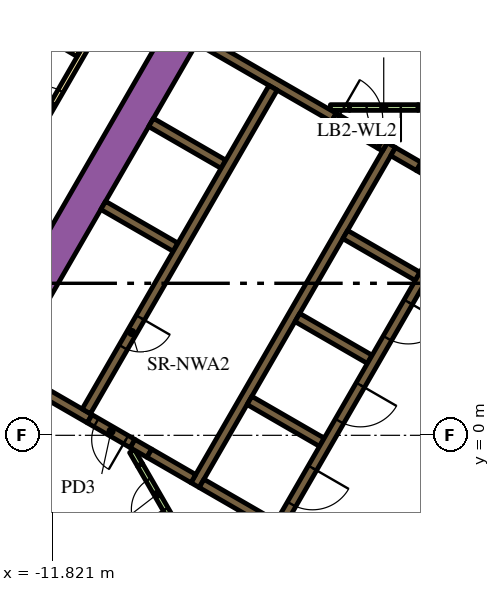
"""IFC4 building model, lengths in metres.
Left out: names, types, materials, properties, quantities, classifications, styles, units other than length and angle.
Written with IfcOpenShell. Run it as: python <this file> out.ifc"""

import sys

from ifc_helpers import new_model, si_unit, direction, frame, frame_2d, origin, place, context, subcontext, project, spatial, polyline, rectangle, outline, extrude, element, fill, save


model = new_model("IFC4")
c1 = context("Model", 3, precision=1e-05, world=origin(), true_north=direction((0.0, 1.0)))
c2 = subcontext(c1, "Body", "Model", "MODEL_VIEW")
j1 = project(units=[si_unit("LENGTHUNIT", "METRE"), si_unit("PLANEANGLEUNIT", "RADIAN")], contexts=[c1])
p1 = place(None, origin())
s1 = spatial("IfcSite", under=j1, at=p1, CompositionType="ELEMENT")
p2 = place(p1, origin())
s2 = spatial("IfcBuilding", under=s1, at=p2, CompositionType="ELEMENT")
p3 = place(p2, frame((0.0, 0.0, 58.8)))
s3 = spatial("IfcBuildingStorey", under=s2, at=p3, CompositionType="ELEMENT", Elevation=58.8)
p4 = place(p3, frame((-14.268, 0.387, 0.0), z_axis=(0.0, 0.0, 1.0), x_axis=(0.499994617707, 0.866028511231, 0.0)))
e1 = element("IfcWall", 1, at=p4, inside=s3, PredefinedType="SOLIDWALL", context=c2, shape_type="SweptSolid", body=[
    extrude(rectangle(XDim=18.817, YDim=0.9, at=frame_2d((9.409, 0.0))), origin(), (0.0, 0.0, 1.0), 3.9),
])
p5 = place(p3, frame((-8.06, -1.311, 0.0), z_axis=(0.0, 0.0, 1.0), x_axis=(0.50000273126, 0.866023826885, 0.0)))
e2 = element("IfcWall", 2, at=p5, inside=s3, PredefinedType="SOLIDWALL", context=c2, shape_type="SweptSolid", body=[
    extrude(rectangle(XDim=10.33, YDim=0.25, at=frame_2d((5.165, 0.0))), origin(), (0.0, 0.0, 1.0), 3.9),
])
p6 = place(p3, frame((-1.819, 6.87, 0.0), z_axis=(0.0, 0.0, 1.0), x_axis=(-0.866294599386, 0.499533449405, 0.0)))
e3 = element("IfcWall", 3, at=p6, inside=s3, PredefinedType="SOLIDWALL", context=c2, shape_type="SweptSolid", body=[
    extrude(rectangle(XDim=0.41, YDim=0.25, at=frame_2d((0.205, 0.0))), origin(), (0.0, 0.0, 1.0), 3.9),
])
p7 = place(p3, frame((-2.849, 7.465, 0.0), z_axis=(0.0, 0.0, 1.0), x_axis=(0.865955664968, -0.500120771724, 0.0)))
e4 = element("IfcWall", 4, at=p7, inside=s3, PredefinedType="SOLIDWALL", context=c2, shape_type="SweptSolid", body=[
    extrude(rectangle(XDim=0.778, YDim=0.25, at=frame_2d((0.389, 0.0))), origin(), (0.0, 0.0, 1.0), 3.9),
])
for number, where, z_axis, x_axis in (
    (5, (-2.204, 4.182, 0.0), (0.0, 0.0, 1.0), (-0.866, 0.5, 0.0)),
    (6, (-5.369, 3.1, 0.0), (0.0, 0.0, 1.0), (0.866, -0.5, 0.0)),
    (7, (-4.724, -0.182, 0.0), (0.0, 0.0, 1.0), (-0.866, 0.5, 0.0)),
):
    element("IfcWall", number, at=place(p3, frame(where, z_axis=z_axis, x_axis=x_axis)), inside=s3, PredefinedType="SOLIDWALL", context=c2, shape_type="SweptSolid", body=[
        extrude(rectangle(XDim=2.2, YDim=0.25, at=frame_2d((1.1, 0.0))), origin(), (0.0, 0.0, 1.0), 3.9),
    ])
p8 = place(p3, origin())
e8 = element("IfcWall", 8, at=p8, inside=s3, PredefinedType="SOLIDWALL", context=c2, shape_type="SweptSolid", body=[
    extrude(outline(polyline([(-5.922, -2.257), (-5.922, -2.257), (-5.705, -2.382), (-5.83, -2.598), (-6.418, -2.258), (-6.433, -2.153), (-6.433, -2.153), (-6.433, -2.153), (-6.508, -2.163), (-6.508, -2.163), (-6.508, -2.163), (-6.501, -2.21), (-7.952, -1.373), (-7.827, -1.156), (-5.922, -2.257)])), origin(), (0.0, 0.0, 1.0), 3.9),
])
p9 = place(p3, frame((-9.708, -0.215, 0.0), z_axis=(0.0, 0.0, 1.0), x_axis=(0.866113839764, -0.499846793097, 0.0)))
e9 = element("IfcWall", 9, at=p9, inside=s3, PredefinedType="SOLIDWALL", context=c2, shape_type="SweptSolid", body=[
    extrude(rectangle(XDim=0.51, YDim=0.25, at=frame_2d((0.255, 0.0))), origin(), (0.0, 0.0, 1.0), 3.9),
])
p10 = place(p3, frame((-12.999, 1.685, 0.0), z_axis=(0.0, 0.0, 1.0), x_axis=(0.865996765544, -0.500049599607, 0.0)))
e10 = element("IfcWall", 10, at=p10, inside=s3, PredefinedType="SOLIDWALL", context=c2, shape_type="SweptSolid", body=[
    extrude(rectangle(XDim=2.498, YDim=0.25, at=frame_2d((1.249, 0.0))), origin(), (0.0, 0.0, 1.0), 3.9),
])
p11 = place(p3, frame((-9.265, -0.471, 0.0), z_axis=(0.0, 0.0, 1.0), x_axis=(0.865954634268, -0.500122556369, 0.0)))
e11 = element("IfcWall", 11, at=p11, inside=s3, PredefinedType="SOLIDWALL", context=c2, shape_type="SweptSolid", body=[
    extrude(rectangle(XDim=1.338, YDim=0.25, at=frame_2d((0.669, 0.0))), origin(), (0.0, 0.0, 1.0), 3.9),
])
e12 = element("IfcWall", 12, at=p8, inside=s3, PredefinedType="SOLIDWALL", context=c2, shape_type="SweptSolid", body=[
    extrude(outline(polyline([(-3.128, 7.481), (-3.259, 7.557), (-3.134, 7.773), (-3.003, 7.698), (-3.128, 7.481)])), origin(), (0.0, 0.0, 1.0), 3.9),
])
for number, where, z_axis, x_axis in (
    (13, (-8.574, 4.95, 0.0), (0.0, 0.0, 1.0), (-0.866, 0.5, 0.0)),
    (14, (-7.314, 7.132, 0.0), (0.0, 0.0, 1.0), (-0.866, 0.5, 0.0)),
):
    element("IfcWall", number, at=place(p3, frame(where, z_axis=z_axis, x_axis=x_axis)), inside=s3, PredefinedType="SOLIDWALL", context=c2, shape_type="SweptSolid", body=[
        extrude(rectangle(XDim=2.2, YDim=0.25, at=frame_2d((1.1, 0.0))), origin(), (0.0, 0.0, 1.0), 3.9),
    ])
p12 = place(p3, frame((-7.959, 10.415, 0.0), z_axis=(0.0, 0.0, 1.0), x_axis=(0.866020958405, -0.500007699544, 0.0)))
e15 = element("IfcWall", 15, at=p12, inside=s3, PredefinedType="SOLIDWALL", context=c2, shape_type="SweptSolid", body=[
    extrude(rectangle(XDim=4.1, YDim=0.25, at=frame_2d((2.05, 0.0))), origin(), (0.0, 0.0, 1.0), 3.9),
])
p13 = place(p3, frame((-6.531, -2.689, 0.0), z_axis=(0.0, 0.0, 1.0), x_axis=(-0.499967446111, 0.866044197965, 0.0)))
e16 = element("IfcWall", 16, at=p13, inside=s3, PredefinedType="PARTITIONING", context=c2, shape_type="SweptSolid", body=[
    extrude(rectangle(XDim=0.748, YDim=0.15, at=frame_2d((0.374, 0.0))), origin(), (0.0, 0.0, 1.0), 2.75),
])
p14 = place(p3, frame((-9.512, -0.775, 0.0), z_axis=(0.0, 0.0, 1.0), x_axis=(-0.500080620599, 0.865978852456, 0.0)))
e17 = element("IfcWall", 17, at=p14, inside=s3, PredefinedType="PARTITIONING", context=c2, shape_type="SweptSolid", body=[
    extrude(rectangle(XDim=0.413, YDim=0.15, at=frame_2d((0.207, 0.0))), origin(), (0.0, 0.0, 1.0), 2.75),
])
p15 = place(p3, frame((-3.997, 8.625, 0.0), z_axis=(0.0, 0.0, 1.0), x_axis=(-1.0, 0.0, 0.0)))
e18 = element("IfcWall", 18, at=p15, inside=s3, PredefinedType="PARTITIONING", context=c2, shape_type="SweptSolid", body=[
    extrude(rectangle(XDim=0.502, YDim=0.15, at=frame_2d((0.251, 0.0))), origin(), (0.0, 0.0, 1.0), 2.75),
])
p16 = place(p3, frame((-2.196, 8.625, 0.0), z_axis=(0.0, 0.0, 1.0), x_axis=(1.0, 0.0, 0.0)))
e19 = element("IfcWall", 19, at=p16, inside=s3, PredefinedType="PARTITIONING", context=c2, shape_type="SweptSolid", body=[
    extrude(rectangle(XDim=1.146, YDim=0.15, at=frame_2d((0.573, 0.0))), origin(), (0.0, 0.0, 1.0), 2.75),
])
p17 = place(p3, frame((-6.008, 9.144, 0.0), z_axis=(0.0, 0.0, 1.0), x_axis=(-0.500006956611, -0.866021387346, 0.0)))
e20 = element("IfcWall", 20, at=p17, inside=s3, PredefinedType="SOLIDWALL", context=c2, shape_type="SweptSolid", body=[
    extrude(rectangle(XDim=9.83, YDim=0.25, at=frame_2d((4.915, 0.0))), origin(), (0.0, 0.0, 1.0), 3.9),
])
p18 = place(p17, frame((6.985, 0.0, 0.0)))
e21 = element("IfcOpeningElement", 21, at=p18, cuts=e20, PredefinedType="OPENING", context=c2, shape_type="SweptSolid", body=[
    extrude(rectangle(XDim=0.9, YDim=2.1, at=frame_2d((0.45, 1.05))), frame((0.0, 0.135, 0.0), z_axis=(0.0, -1.0, 0.0), x_axis=(1.0, 0.0, 0.0)), (0.0, 0.0, 1.0), 0.27),
])
p19 = place(p3, frame((-0.898, 6.194, 0.0), z_axis=(0.0, 0.0, 1.0), x_axis=(-0.499996202215, -0.866027596426, 0.0)))
e22 = element("IfcWall", 22, at=p19, inside=s3, PredefinedType="SOLIDWALL", context=c2, shape_type="SweptSolid", body=[
    extrude(rectangle(XDim=9.83, YDim=0.25, at=frame_2d((4.915, 0.0))), origin(), (0.0, 0.0, 1.0), 3.9),
])
p20 = place(p19, frame((0.585, 0.0, 0.0)))
e23 = element("IfcOpeningElement", 23, at=p20, cuts=e22, PredefinedType="OPENING", context=c2, shape_type="SweptSolid", body=[
    extrude(rectangle(XDim=1.1, YDim=2.1, at=frame_2d((0.55, 1.05))), frame((0.0, 0.135, 0.0), z_axis=(0.0, -1.0, 0.0), x_axis=(1.0, 0.0, 0.0)), (0.0, 0.0, 1.0), 0.27),
])
p21 = place(p19, frame((3.105, 0.0, 0.0)))
e24 = element("IfcOpeningElement", 24, at=p21, cuts=e22, PredefinedType="OPENING", context=c2, shape_type="SweptSolid", body=[
    extrude(rectangle(XDim=1.1, YDim=2.1, at=frame_2d((0.55, 1.05))), frame((0.0, 0.135, 0.0), z_axis=(0.0, -1.0, 0.0), x_axis=(1.0, 0.0, 0.0)), (0.0, 0.0, 1.0), 0.27),
])
p22 = place(p19, frame((5.625, 0.0, 0.0)))
e25 = element("IfcOpeningElement", 25, at=p22, cuts=e22, PredefinedType="OPENING", context=c2, shape_type="SweptSolid", body=[
    extrude(rectangle(XDim=1.1, YDim=2.1, at=frame_2d((0.55, 1.05))), frame((0.0, 0.135, 0.0), z_axis=(0.0, -1.0, 0.0), x_axis=(1.0, 0.0, 0.0)), (0.0, 0.0, 1.0), 0.27),
])
p23 = place(p19, frame((8.145, 0.0, 0.0)))
e26 = element("IfcOpeningElement", 26, at=p23, cuts=e22, PredefinedType="OPENING", context=c2, shape_type="SweptSolid", body=[
    extrude(rectangle(XDim=1.1, YDim=2.1, at=frame_2d((0.55, 1.05))), frame((0.0, 0.135, 0.0), z_axis=(0.0, -1.0, 0.0), x_axis=(1.0, 0.0, 0.0)), (0.0, 0.0, 1.0), 0.27),
])
p24 = place(p3, frame((-2.196, 8.625, 0.0), z_axis=(0.0, 0.0, 1.0), x_axis=(-1.0, 0.0, 0.0)))
e27 = element("IfcWall", 27, at=p24, inside=s3, PredefinedType="PARTITIONING", context=c2, shape_type="SweptSolid", body=[
    extrude(rectangle(XDim=1.8, YDim=0.15, at=frame_2d((0.9, 0.0))), origin(), (0.0, 0.0, 1.0), 2.75),
])
p25 = place(p24, frame((0.45, 0.0, 0.0)))
e28 = element("IfcOpeningElement", 28, at=p25, cuts=e27, PredefinedType="OPENING", context=c2, shape_type="SweptSolid", body=[
    extrude(rectangle(XDim=0.9, YDim=2.1, at=frame_2d((0.45, 1.05))), frame((0.0, 0.085, 0.0), z_axis=(0.0, -1.0, 0.0), x_axis=(1.0, 0.0, 0.0)), (0.0, 0.0, 1.0), 0.17),
])
p26 = place(p3, frame((-9.708, -0.215, 0.0), z_axis=(0.0, 0.0, 1.0), x_axis=(-0.866004217611, 0.500036693733, 0.0)))
e29 = element("IfcWall", 29, at=p26, inside=s3, PredefinedType="SOLIDWALL", context=c2, shape_type="SweptSolid", body=[
    extrude(rectangle(XDim=1.3, YDim=0.25, at=frame_2d((0.65, 0.0))), origin(), (0.0, 0.0, 1.0), 3.9),
])
p27 = place(p26, frame((0.2, 0.0, 0.0)))
e30 = element("IfcOpeningElement", 30, at=p27, cuts=e29, PredefinedType="OPENING", context=c2, shape_type="SweptSolid", body=[
    extrude(rectangle(XDim=0.9, YDim=2.1, at=frame_2d((0.45, 1.05))), frame((0.0, 0.135, 0.0), z_axis=(0.0, -1.0, 0.0), x_axis=(1.0, 0.0, 0.0)), (0.0, 0.0, 1.0), 0.27),
])
p28 = place(p3, frame((-4.409, 8.365, 0.0), z_axis=(0.0, 0.0, 1.0), x_axis=(0.866034573852, -0.49998411664, 0.0)))
e31 = element("IfcWall", 31, at=p28, inside=s3, PredefinedType="SOLIDWALL", context=c2, shape_type="SweptSolid", body=[
    extrude(rectangle(XDim=1.4, YDim=0.25, at=frame_2d((0.7, 0.0))), origin(), (0.0, 0.0, 1.0), 3.9),
])
p29 = place(p28, frame((0.1, 0.0, 0.0)))
e32 = element("IfcOpeningElement", 32, at=p29, cuts=e31, PredefinedType="OPENING", context=c2, shape_type="SweptSolid", body=[
    extrude(rectangle(XDim=1.2, YDim=2.1, at=frame_2d((0.6, 1.05))), frame((0.0, 0.135, 0.0), z_axis=(0.0, -1.0, 0.0), x_axis=(1.0, 0.0, 0.0)), (0.0, 0.0, 1.0), 0.27),
])
p30 = place(p3, frame((-8.612, -2.333, 0.0), z_axis=(0.0, 0.0, 1.0), x_axis=(-0.499961193289, 0.866047807691, 0.0)))
e33 = element("IfcWall", 33, at=p30, inside=s3, PredefinedType="PARTITIONING", context=c2, shape_type="SweptSolid", body=[
    extrude(rectangle(XDim=1.8, YDim=0.15, at=frame_2d((0.9, 0.0))), origin(), (0.0, 0.0, 1.0), 2.75),
])
p31 = place(p30, frame((0.45, 0.0, 0.0)))
e34 = element("IfcOpeningElement", 34, at=p31, cuts=e33, PredefinedType="OPENING", context=c2, shape_type="SweptSolid", body=[
    extrude(rectangle(XDim=0.9, YDim=2.1, at=frame_2d((0.45, 1.05))), frame((0.0, 0.085, 0.0), z_axis=(0.0, -1.0, 0.0), x_axis=(1.0, 0.0, 0.0)), (0.0, 0.0, 1.0), 0.17),
])
p32 = place(p3, frame((-19.081, -3.9, 0.0), z_axis=(0.0, 0.0, 1.0), x_axis=(0.499998313975, 0.866026377209, 0.0)))
e35 = element("IfcWall", 35, at=p32, inside=s3, PredefinedType="PARTITIONING", context=c2, shape_type="SweptSolid", body=[
    extrude(rectangle(XDim=25.766, YDim=0.15, at=frame_2d((12.883, 0.0))), origin(), (0.0, 0.0, 1.0), 2.75),
])
p33 = place(p32, frame((22.445, 0.0, 0.0)))
e36 = element("IfcOpeningElement", 36, at=p33, cuts=e35, PredefinedType="OPENING", context=c2, shape_type="SweptSolid", body=[
    extrude(rectangle(XDim=1.0, YDim=2.1, at=frame_2d((0.5, 1.05))), frame((0.0, 0.085, 0.0), z_axis=(0.0, -1.0, 0.0), x_axis=(1.0, 0.0, 0.0)), (0.0, 0.0, 1.0), 0.17),
])
p34 = place(p32, frame((21.138, 0.0, 0.0)))
e37 = element("IfcOpeningElement", 37, at=p34, cuts=e35, PredefinedType="OPENING", context=c2, shape_type="SweptSolid", body=[
    extrude(rectangle(XDim=1.0, YDim=2.1, at=frame_2d((0.5, 1.05))), frame((0.0, 0.085, 0.0), z_axis=(0.0, -1.0, 0.0), x_axis=(1.0, 0.0, 0.0)), (0.0, 0.0, 1.0), 0.17),
])
p35 = place(p32, frame((14.066, 0.0, 0.0)))
e38 = element("IfcOpeningElement", 38, at=p35, cuts=e35, PredefinedType="OPENING", context=c2, shape_type="SweptSolid", body=[
    extrude(rectangle(XDim=0.9, YDim=2.1, at=frame_2d((0.45, 1.05))), frame((0.0, 0.085, 0.0), z_axis=(0.0, -1.0, 0.0), x_axis=(1.0, 0.0, 0.0)), (0.0, 0.0, 1.0), 0.17),
])
p36 = place(p32, frame((11.693, 0.0, 0.0)))
e39 = element("IfcOpeningElement", 39, at=p36, cuts=e35, PredefinedType="OPENING", context=c2, shape_type="SweptSolid", body=[
    extrude(rectangle(XDim=1.0, YDim=2.1, at=frame_2d((0.5, 1.05))), frame((0.0, 0.085, 0.0), z_axis=(0.0, -1.0, 0.0), x_axis=(1.0, 0.0, 0.0)), (0.0, 0.0, 1.0), 0.17),
])
p37 = place(p3, frame((-17.856, 13.999, 0.0), z_axis=(0.0, 0.0, 1.0), x_axis=(0.861371519381, -0.507975497047, 0.0)))
e40 = element("IfcWall", 40, at=p37, inside=s3, PredefinedType="PARTITIONING", context=c2, shape_type="SweptSolid", body=[
    extrude(rectangle(XDim=7.804, YDim=0.15, at=frame_2d((3.902, 0.0))), origin(), (0.0, 0.0, 1.0), 2.75),
])
p38 = place(p18, origin())
e41 = element("IfcDoor", 41, at=p38, inside=s3, OperationType="SINGLE_SWING_LEFT", PredefinedType="DOOR", context=c2, shape_type="SweptSolid", body=[
    extrude(rectangle(XDim=0.9, YDim=2.1, at=frame_2d((0.45, 1.05))), frame((0.0, 0.025, 0.0), z_axis=(0.0, -1.0, 0.0), x_axis=(1.0, 0.0, 0.0)), (0.0, 0.0, 1.0), 0.05),
])
fill(e21, e41)
p39 = place(p21, origin())
e42 = element("IfcDoor", 42, at=p39, inside=s3, OperationType="DOUBLE_DOOR_SLIDING", PredefinedType="DOOR", context=c2, shape_type="SweptSolid", body=[
    extrude(rectangle(XDim=1.1, YDim=2.1, at=frame_2d((0.55, 1.05))), frame((0.0, 0.025, 0.0), z_axis=(0.0, -1.0, 0.0), x_axis=(1.0, 0.0, 0.0)), (0.0, 0.0, 1.0), 0.05),
])
fill(e24, e42)
p40 = place(p22, origin())
e43 = element("IfcDoor", 43, at=p40, inside=s3, OperationType="DOUBLE_DOOR_SLIDING", PredefinedType="DOOR", context=c2, shape_type="SweptSolid", body=[
    extrude(rectangle(XDim=1.1, YDim=2.1, at=frame_2d((0.55, 1.05))), frame((0.0, 0.025, 0.0), z_axis=(0.0, -1.0, 0.0), x_axis=(1.0, 0.0, 0.0)), (0.0, 0.0, 1.0), 0.05),
])
fill(e25, e43)
p41 = place(p23, origin())
e44 = element("IfcDoor", 44, at=p41, inside=s3, OperationType="DOUBLE_DOOR_SLIDING", PredefinedType="DOOR", context=c2, shape_type="SweptSolid", body=[
    extrude(rectangle(XDim=1.1, YDim=2.1, at=frame_2d((0.55, 1.05))), frame((0.0, 0.025, 0.0), z_axis=(0.0, -1.0, 0.0), x_axis=(1.0, 0.0, 0.0)), (0.0, 0.0, 1.0), 0.05),
])
fill(e26, e44)
p42 = place(p25, origin())
e45 = element("IfcDoor", 45, at=p42, inside=s3, OperationType="SINGLE_SWING_LEFT", PredefinedType="DOOR", context=c2, shape_type="SweptSolid", body=[
    extrude(rectangle(XDim=0.9, YDim=2.1, at=frame_2d((0.45, 1.05))), frame((0.0, 0.025, 0.0), z_axis=(0.0, -1.0, 0.0), x_axis=(1.0, 0.0, 0.0)), (0.0, 0.0, 1.0), 0.05),
])
fill(e28, e45)
p43 = place(p27, origin())
e46 = element("IfcDoor", 46, at=p43, inside=s3, OperationType="SINGLE_SWING_LEFT", PredefinedType="DOOR", context=c2, shape_type="SweptSolid", body=[
    extrude(rectangle(XDim=0.9, YDim=2.1, at=frame_2d((0.45, 1.05))), frame((0.0, 0.025, 0.0), z_axis=(0.0, -1.0, 0.0), x_axis=(1.0, 0.0, 0.0)), (0.0, 0.0, 1.0), 0.05),
])
fill(e30, e46)
p44 = place(p29, origin())
e47 = element("IfcDoor", 47, at=p44, inside=s3, OperationType="SINGLE_SWING_LEFT", PredefinedType="DOOR", context=c2, shape_type="SweptSolid", body=[
    extrude(rectangle(XDim=1.2, YDim=2.1, at=frame_2d((0.6, 1.05))), frame((0.0, 0.025, 0.0), z_axis=(0.0, -1.0, 0.0), x_axis=(1.0, 0.0, 0.0)), (0.0, 0.0, 1.0), 0.05),
])
fill(e32, e47)
p45 = place(p31, origin())
e48 = element("IfcDoor", 48, at=p45, inside=s3, OperationType="SINGLE_SWING_LEFT", PredefinedType="DOOR", context=c2, shape_type="SweptSolid", body=[
    extrude(rectangle(XDim=0.9, YDim=2.1, at=frame_2d((0.45, 1.05))), frame((0.0, 0.025, 0.0), z_axis=(0.0, -1.0, 0.0), x_axis=(1.0, 0.0, 0.0)), (0.0, 0.0, 1.0), 0.05),
])
fill(e34, e48)
p46 = place(p35, origin())
e49 = element("IfcDoor", 49, at=p46, inside=s3, OperationType="SINGLE_SWING_RIGHT", PredefinedType="DOOR", context=c2, shape_type="SweptSolid", body=[
    extrude(rectangle(XDim=0.9, YDim=2.1, at=frame_2d((0.45, 1.05))), frame((0.0, 0.025, 0.0), z_axis=(0.0, -1.0, 0.0), x_axis=(1.0, 0.0, 0.0)), (0.0, 0.0, 1.0), 0.05),
])
fill(e38, e49)
save(model, sys.argv[1])
